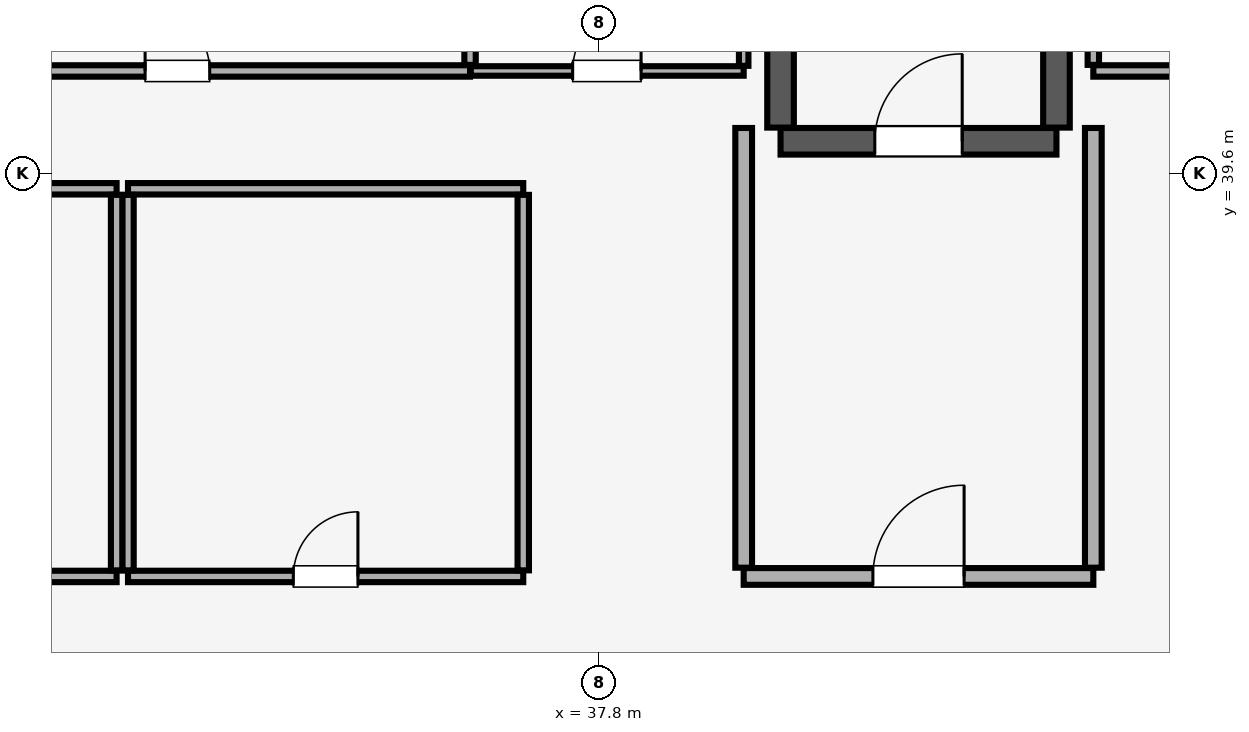
"""IFC4 building model, lengths in metres.
Left out: names, types, materials, properties, quantities, classifications, styles, units other than length and angle.
Written with IfcOpenShell. Run it as: python <this file> out.ifc"""

import sys

from ifc_helpers import new_model, si_unit, direction, frame, frame_2d, origin, place, context, subcontext, project, spatial, rectangle, extrude, element, fill, save


model = new_model("IFC4")
c1 = context("Model", 3, precision=1e-05, world=origin(), true_north=direction((0.0, 1.0)))
c2 = subcontext(c1, "Body", "Model", "MODEL_VIEW")
j1 = project(units=[si_unit("LENGTHUNIT", "METRE"), si_unit("PLANEANGLEUNIT", "RADIAN")], contexts=[c1])
p1 = place(None, origin())
s1 = spatial("IfcSite", under=j1, at=p1, CompositionType="ELEMENT")
p2 = place(p1, origin())
s2 = spatial("IfcBuilding", under=s1, at=p2, CompositionType="ELEMENT")
p3 = place(p2, frame((0.0, 0.0, 180.95)))
s3 = spatial("IfcBuildingStorey", under=s2, at=p3, CompositionType="ELEMENT", Elevation=180.95)
p4 = place(p3, frame((40.185, 40.025, 0.0), z_axis=(0.0, 0.0, 1.0), x_axis=(1.0, 0.0, 0.0)))
e1 = element("IfcWall", 1, at=p4, inside=s3, PredefinedType="SHEAR", context=c2, shape_type="SweptSolid", body=[
    extrude(rectangle(XDim=3.63, YDim=0.35, at=frame_2d((1.815, 0.0))), origin(), (0.0, 0.0, 1.0), 3.45),
])
p5 = place(p4, frame((1.24, 0.0, 0.0)))
e2 = element("IfcOpeningElement", 2, at=p5, cuts=e1, PredefinedType="OPENING", context=c2, shape_type="SweptSolid", body=[
    extrude(rectangle(XDim=1.15, YDim=2.15, at=frame_2d((0.575, 1.075))), frame((0.0, 0.185, 0.0), z_axis=(0.0, -1.0, 0.0), x_axis=(1.0, 0.0, 0.0)), (0.0, 0.0, 1.0), 0.37),
])
for number, where, z_axis, x_axis in (
    (3, (40.185, 40.205, 0.0), (0.0, 0.0, 1.0), (0.0, 1.0, 0.0)),
    (4, (43.815, 40.205, 0.0), (0.0, 0.0, 1.0), (0.0, 1.0, 0.0)),
):
    element("IfcWall", number, at=place(p3, frame(where, z_axis=z_axis, x_axis=x_axis)), inside=s3, PredefinedType="SHEAR", context=c2, shape_type="SweptSolid", body=[
        extrude(rectangle(XDim=8.09, YDim=0.35, at=frame_2d((4.045, 0.0))), origin(), (0.0, 0.0, 1.0), 3.45),
    ])
p6 = place(p3, frame((39.7, 34.3, 0.0), z_axis=(0.0, 0.0, 1.0), x_axis=(1.0, 0.0, 0.0)))
e5 = element("IfcWall", 5, at=p6, inside=s3, PredefinedType="PARTITIONING", context=c2, shape_type="SweptSolid", body=[
    extrude(rectangle(XDim=4.6, YDim=0.22, at=frame_2d((2.3, 0.0))), origin(), (0.0, 0.0, 1.0), 3.45),
])
p7 = place(p6, frame((1.7, 0.0, 0.0)))
e6 = element("IfcOpeningElement", 6, at=p7, cuts=e5, PredefinedType="OPENING", context=c2, shape_type="SweptSolid", body=[
    extrude(rectangle(XDim=1.2, YDim=2.15, at=frame_2d((0.6, 1.075))), frame((0.0, 0.12, 0.0), z_axis=(0.0, -1.0, 0.0), x_axis=(1.0, 0.0, 0.0)), (0.0, 0.0, 1.0), 0.24),
])
for number, where, z_axis, x_axis in (
    (7, (39.7, 34.415, 0.0), (0.0, 0.0, 1.0), (0.0, 1.0, 0.0)),
    (8, (44.3, 34.415, 0.0), (0.0, 0.0, 1.0), (0.0, 1.0, 0.0)),
):
    element("IfcWall", number, at=place(p3, frame(where, z_axis=z_axis, x_axis=x_axis)), inside=s3, PredefinedType="PARTITIONING", context=c2, shape_type="SweptSolid", body=[
        extrude(rectangle(XDim=5.785, YDim=0.22, at=frame_2d((2.893, 0.0))), origin(), (0.0, 0.0, 1.0), 3.45),
    ])
p8 = place(p3, frame((31.6, 34.3, 0.0), z_axis=(0.0, 0.0, 1.0), x_axis=(1.0, 0.0, 0.0)))
e9 = element("IfcWall", 9, at=p8, inside=s3, PredefinedType="PARTITIONING", context=c2, shape_type="SweptSolid", body=[
    extrude(rectangle(XDim=5.2, YDim=0.15, at=frame_2d((2.6, 0.0))), origin(), (0.0, 0.0, 1.0), 3.45),
])
p9 = place(p8, frame((2.175, 0.0, 0.0)))
e10 = element("IfcOpeningElement", 10, at=p9, cuts=e9, PredefinedType="OPENING", context=c2, shape_type="SweptSolid", body=[
    extrude(rectangle(XDim=0.85, YDim=2.1, at=frame_2d((0.425, 1.05))), frame((0.0, 0.085, 0.0), z_axis=(0.0, -1.0, 0.0), x_axis=(1.0, 0.0, 0.0)), (0.0, 0.0, 1.0), 0.17),
])
p10 = place(p3, frame((31.6, 39.4, 0.0), z_axis=(0.0, 0.0, 1.0), x_axis=(1.0, 0.0, 0.0)))
e11 = element("IfcWall", 11, at=p10, inside=s3, PredefinedType="PARTITIONING", context=c2, shape_type="SweptSolid", body=[
    extrude(rectangle(XDim=5.2, YDim=0.15, at=frame_2d((2.6, 0.0))), origin(), (0.0, 0.0, 1.0), 3.45),
])
for number, where, z_axis, x_axis in (
    (12, (31.6, 34.38, 0.0), (0.0, 0.0, 1.0), (0.0, 1.0, 0.0)),
    (13, (36.8, 34.38, 0.0), (0.0, 0.0, 1.0), (0.0, 1.0, 0.0)),
):
    element("IfcWall", number, at=place(p3, frame(where, z_axis=z_axis, x_axis=x_axis)), inside=s3, PredefinedType="PARTITIONING", context=c2, shape_type="SweptSolid", body=[
        extrude(rectangle(XDim=4.94, YDim=0.15, at=frame_2d((2.47, 0.0))), origin(), (0.0, 0.0, 1.0), 3.45),
    ])
p11 = place(p3, frame((23.8, 34.3, 0.0), z_axis=(0.0, 0.0, 1.0), x_axis=(1.0, 0.0, 0.0)))
e14 = element("IfcWall", 14, at=p11, inside=s3, PredefinedType="PARTITIONING", context=c2, shape_type="SweptSolid", body=[
    extrude(rectangle(XDim=7.65, YDim=0.15, at=frame_2d((3.825, 0.0))), origin(), (0.0, 0.0, 1.0), 3.45),
])
p12 = place(p11, frame((3.3, 0.0, 0.0)))
e15 = element("IfcOpeningElement", 15, at=p12, cuts=e14, PredefinedType="OPENING", context=c2, shape_type="SweptSolid", body=[
    extrude(rectangle(XDim=1.0, YDim=2.15, at=frame_2d((0.5, 1.075))), frame((0.0, 0.085, 0.0), z_axis=(0.0, -1.0, 0.0), x_axis=(1.0, 0.0, 0.0)), (0.0, 0.0, 1.0), 0.17),
])
p13 = place(p3, frame((23.8, 39.4, 0.0), z_axis=(0.0, 0.0, 1.0), x_axis=(1.0, 0.0, 0.0)))
e16 = element("IfcWall", 16, at=p13, inside=s3, PredefinedType="PARTITIONING", context=c2, shape_type="SweptSolid", body=[
    extrude(rectangle(XDim=7.65, YDim=0.15, at=frame_2d((3.825, 0.0))), origin(), (0.0, 0.0, 1.0), 3.45),
])
p14 = place(p3, frame((31.45, 34.38, 0.0), z_axis=(0.0, 0.0, 1.0), x_axis=(0.0, 1.0, 0.0)))
e17 = element("IfcWall", 17, at=p14, inside=s3, PredefinedType="PARTITIONING", context=c2, shape_type="SweptSolid", body=[
    extrude(rectangle(XDim=4.94, YDim=0.15, at=frame_2d((2.47, 0.0))), origin(), (0.0, 0.0, 1.0), 3.45),
])
p15 = place(p3, frame((28.41, 40.95, 0.0), z_axis=(0.0, 0.0, 1.0), x_axis=(1.0, 0.0, 0.0)))
e18 = element("IfcWall", 18, at=p15, inside=s3, PredefinedType="PARTITIONING", context=c2, shape_type="SweptSolid", body=[
    extrude(rectangle(XDim=7.69, YDim=0.15, at=frame_2d((3.845, 0.0))), origin(), (0.0, 0.0, 1.0), 3.45),
])
p16 = place(p15, frame((3.415, 0.0, 0.0)))
e19 = element("IfcOpeningElement", 19, at=p16, cuts=e18, PredefinedType="OPENING", context=c2, shape_type="SweptSolid", body=[
    extrude(rectangle(XDim=0.85, YDim=2.1, at=frame_2d((0.425, 1.05))), frame((0.0, 0.085, 0.0), z_axis=(0.0, -1.0, 0.0), x_axis=(1.0, 0.0, 0.0)), (0.0, 0.0, 1.0), 0.17),
])
p17 = place(p3, frame((36.1, 41.03, 0.0), z_axis=(0.0, 0.0, 1.0), x_axis=(0.0, 1.0, 0.0)))
e20 = element("IfcWall", 20, at=p17, inside=s3, PredefinedType="PARTITIONING", context=c2, shape_type="SweptSolid", body=[
    extrude(rectangle(XDim=7.82, YDim=0.15, at=frame_2d((3.91, 0.0))), origin(), (0.0, 0.0, 1.0), 3.45),
])
p18 = place(p3, frame((36.11, 40.95, 0.0), z_axis=(0.0, 0.0, 1.0), x_axis=(1.0, 0.0, 0.0)))
e21 = element("IfcWall", 21, at=p18, inside=s3, PredefinedType="PARTITIONING", context=c2, shape_type="SweptSolid", body=[
    extrude(rectangle(XDim=3.59, YDim=0.125, at=frame_2d((1.795, 0.0))), origin(), (0.0, 0.0, 1.0), 3.45),
])
p19 = place(p18, frame((1.34, 0.0, 0.0)))
e22 = element("IfcOpeningElement", 22, at=p19, cuts=e21, PredefinedType="OPENING", context=c2, shape_type="SweptSolid", body=[
    extrude(rectangle(XDim=0.9, YDim=2.1, at=frame_2d((0.45, 1.05))), frame((0.0, 0.073, 0.0), z_axis=(0.0, -1.0, 0.0), x_axis=(1.0, 0.0, 0.0)), (0.0, 0.0, 1.0), 0.145),
])
p20 = place(p3, frame((39.7, 41.018, 0.0), z_axis=(0.0, 0.0, 1.0), x_axis=(0.0, 1.0, 0.0)))
e23 = element("IfcWall", 23, at=p20, inside=s3, PredefinedType="PARTITIONING", context=c2, shape_type="SweptSolid", body=[
    extrude(rectangle(XDim=3.715, YDim=0.125, at=frame_2d((1.857, 0.0))), origin(), (0.0, 0.0, 1.0), 3.45),
])
p21 = place(p3, frame((44.3, 40.95, 0.0), z_axis=(0.0, 0.0, 1.0), x_axis=(1.0, 0.0, 0.0)))
e24 = element("IfcWall", 24, at=p21, inside=s3, PredefinedType="PARTITIONING", context=c2, shape_type="SweptSolid", body=[
    extrude(rectangle(XDim=5.1, YDim=0.15, at=frame_2d((2.55, 0.0))), origin(), (0.0, 0.0, 1.0), 3.45),
])
p22 = place(p21, frame((2.875, 0.0, 0.0)))
e25 = element("IfcOpeningElement", 25, at=p22, cuts=e24, PredefinedType="OPENING", context=c2, shape_type="SweptSolid", body=[
    extrude(rectangle(XDim=0.85, YDim=2.1, at=frame_2d((0.425, 1.05))), frame((0.0, 0.085, 0.0), z_axis=(0.0, -1.0, 0.0), x_axis=(1.0, 0.0, 0.0)), (0.0, 0.0, 1.0), 0.17),
])
p23 = place(p3, frame((44.3, 41.03, 0.0), z_axis=(0.0, 0.0, 1.0), x_axis=(0.0, 1.0, 0.0)))
e26 = element("IfcWall", 26, at=p23, inside=s3, PredefinedType="PARTITIONING", context=c2, shape_type="SweptSolid", body=[
    extrude(rectangle(XDim=7.82, YDim=0.15, at=frame_2d((3.91, 0.0))), origin(), (0.0, 0.0, 1.0), 3.45),
])
p24 = place(p5, origin())
e27 = element("IfcDoor", 27, at=p24, inside=s3, OperationType="SINGLE_SWING_RIGHT", PredefinedType="DOOR", context=c2, shape_type="SweptSolid", body=[
    extrude(rectangle(XDim=1.15, YDim=2.15, at=frame_2d((0.575, 1.075))), frame((0.0, 0.025, 0.0), z_axis=(0.0, -1.0, 0.0), x_axis=(1.0, 0.0, 0.0)), (0.0, 0.0, 1.0), 0.05),
])
fill(e2, e27)
p25 = place(p7, origin())
e28 = element("IfcDoor", 28, at=p25, inside=s3, OperationType="SINGLE_SWING_RIGHT", PredefinedType="DOOR", context=c2, shape_type="SweptSolid", body=[
    extrude(rectangle(XDim=1.2, YDim=2.15, at=frame_2d((0.6, 1.075))), frame((0.0, 0.025, 0.0), z_axis=(0.0, -1.0, 0.0), x_axis=(1.0, 0.0, 0.0)), (0.0, 0.0, 1.0), 0.05),
])
fill(e6, e28)
p26 = place(p9, origin())
e29 = element("IfcDoor", 29, at=p26, inside=s3, OperationType="SINGLE_SWING_RIGHT", PredefinedType="DOOR", context=c2, shape_type="SweptSolid", body=[
    extrude(rectangle(XDim=0.85, YDim=2.1, at=frame_2d((0.425, 1.05))), frame((0.0, 0.025, 0.0), z_axis=(0.0, -1.0, 0.0), x_axis=(1.0, 0.0, 0.0)), (0.0, 0.0, 1.0), 0.05),
])
fill(e10, e29)
p27 = place(p16, origin())
e30 = element("IfcDoor", 30, at=p27, inside=s3, OperationType="SINGLE_SWING_LEFT", PredefinedType="DOOR", context=c2, shape_type="SweptSolid", body=[
    extrude(rectangle(XDim=0.85, YDim=2.1, at=frame_2d((0.425, 1.05))), frame((0.0, 0.025, 0.0), z_axis=(0.0, -1.0, 0.0), x_axis=(1.0, 0.0, 0.0)), (0.0, 0.0, 1.0), 0.05),
])
fill(e19, e30)
p28 = place(p19, origin())
e31 = element("IfcDoor", 31, at=p28, inside=s3, OperationType="SINGLE_SWING_RIGHT", PredefinedType="DOOR", context=c2, shape_type="SweptSolid", body=[
    extrude(rectangle(XDim=0.9, YDim=2.1, at=frame_2d((0.45, 1.05))), frame((0.0, 0.025, 0.0), z_axis=(0.0, -1.0, 0.0), x_axis=(1.0, 0.0, 0.0)), (0.0, 0.0, 1.0), 0.05),
])
fill(e22, e31)
save(model, sys.argv[1])
